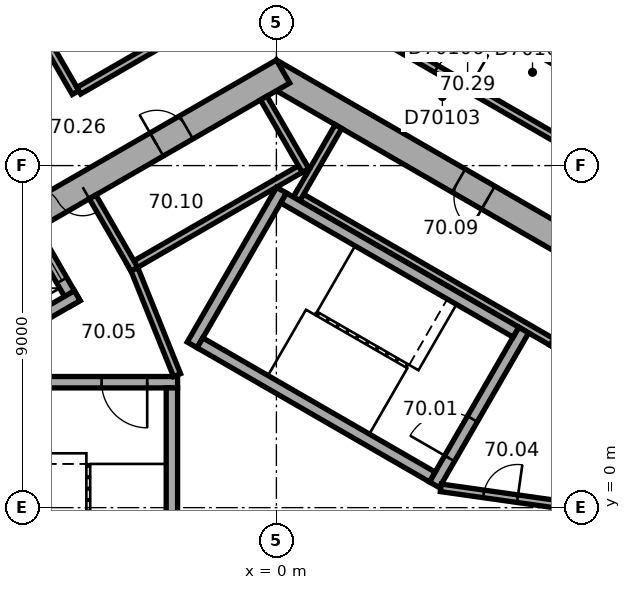
"""IFC4 building model, lengths in metres.
Left out: names, types, materials, properties, quantities, classifications, styles, units other than length and angle.
Written with IfcOpenShell. Run it as: python <this file> out.ifc"""

import sys

from ifc_helpers import new_model, si_unit, direction, frame, frame_2d, origin, place, context, subcontext, project, spatial, rectangle, extrude, element, fill, save


model = new_model("IFC4")
c1 = context("Model", 3, precision=1e-05, world=origin(), true_north=direction((0.0, 1.0)))
c2 = subcontext(c1, "Body", "Model", "MODEL_VIEW")
j1 = project(units=[si_unit("LENGTHUNIT", "METRE"), si_unit("PLANEANGLEUNIT", "RADIAN")], contexts=[c1])
p1 = place(None, origin())
s1 = spatial("IfcSite", under=j1, at=p1, CompositionType="ELEMENT")
p2 = place(p1, origin())
s2 = spatial("IfcBuilding", under=s1, at=p2, CompositionType="ELEMENT")
p3 = place(p2, frame((0.0, 0.0, 285.7)))
s3 = spatial("IfcBuildingStorey", under=s2, at=p3, CompositionType="ELEMENT", Elevation=285.7)
p4 = place(p3, frame((10.025, 5.586, 0.0), z_axis=(0.0, 0.0, 1.0), x_axis=(-0.866026453023, 0.499998182661, 0.0)))
e1 = element("IfcWall", 1, at=p4, inside=s3, PredefinedType="SHEAR", context=c2, shape_type="SweptSolid", body=[
    extrude(rectangle(XDim=11.778, YDim=0.7, at=frame_2d((5.889, 0.0))), origin(), (0.0, 0.0, 1.0), 3.7),
])
p5 = place(p4, frame((5.139, 0.0, 0.0)))
e2 = element("IfcOpeningElement", 2, at=p5, cuts=e1, PredefinedType="OPENING", context=c2, shape_type="SweptSolid", body=[
    extrude(rectangle(XDim=0.9, YDim=2.1, at=frame_2d((0.45, 1.05))), frame((0.0, 0.36, 0.0), z_axis=(0.0, -1.0, 0.0), x_axis=(1.0, 0.0, 0.0)), (0.0, 0.0, 1.0), 0.72),
])
p6 = place(p3, frame((0.175, 11.475, 0.0), z_axis=(0.0, 0.0, 1.0), x_axis=(-0.866026453023, -0.499998182661, 0.0)))
e3 = element("IfcWall", 3, at=p6, inside=s3, PredefinedType="SHEAR", context=c2, shape_type="SweptSolid", body=[
    extrude(rectangle(XDim=11.778, YDim=0.7, at=frame_2d((5.889, 0.0))), origin(), (0.0, 0.0, 1.0), 3.7),
])
p7 = place(p6, frame((6.089, 0.0, 0.0)))
e4 = element("IfcOpeningElement", 4, at=p7, cuts=e3, PredefinedType="OPENING", context=c2, shape_type="SweptSolid", body=[
    extrude(rectangle(XDim=1.5, YDim=2.1, at=frame_2d((0.75, 1.05))), frame((0.0, 0.36, 0.0), z_axis=(0.0, -1.0, 0.0), x_axis=(1.0, 0.0, 0.0)), (0.0, 0.0, 1.0), 0.72),
])
p8 = place(p6, frame((2.939, 0.0, 0.0)))
e5 = element("IfcOpeningElement", 5, at=p8, cuts=e3, PredefinedType="OPENING", context=c2, shape_type="SweptSolid", body=[
    extrude(rectangle(XDim=0.9, YDim=2.1, at=frame_2d((0.45, 1.05))), frame((0.0, 0.36, 0.0), z_axis=(0.0, -1.0, 0.0), x_axis=(1.0, 0.0, 0.0)), (0.0, 0.0, 1.0), 0.72),
])
p9 = place(p3, frame((-2.624, 20.713, 0.0), z_axis=(0.0, 0.0, 1.0), x_axis=(-0.866026460444, -0.499998169808, 0.0)))
e6 = element("IfcWall", 6, at=p9, inside=s3, PredefinedType="STANDARD", context=c2, shape_type="SweptSolid", body=[
    extrude(rectangle(XDim=17.731, YDim=0.2, at=frame_2d((8.866, 0.0))), origin(), (0.0, 0.0, 1.0), 3.7),
])
p10 = place(p9, frame((1.203, 0.0, 0.9)))
e7 = element("IfcOpeningElement", 7, at=p10, cuts=e6, PredefinedType="OPENING", context=c2, shape_type="SweptSolid", body=[
    extrude(rectangle(XDim=2.0, YDim=2.0, at=frame_2d((1.0, 1.0))), frame((0.0, 0.11, 0.0), z_axis=(0.0, -1.0, 0.0), x_axis=(1.0, 0.0, 0.0)), (0.0, 0.0, 1.0), 0.22),
])
p11 = place(p9, frame((4.535, 0.0, 0.9)))
e8 = element("IfcOpeningElement", 8, at=p11, cuts=e6, PredefinedType="OPENING", context=c2, shape_type="SweptSolid", body=[
    extrude(rectangle(XDim=2.0, YDim=2.0, at=frame_2d((1.0, 1.0))), frame((0.0, 0.11, 0.0), z_axis=(0.0, -1.0, 0.0), x_axis=(1.0, 0.0, 0.0)), (0.0, 0.0, 1.0), 0.22),
])
p12 = place(p9, frame((7.867, 0.0, 0.9)))
e9 = element("IfcOpeningElement", 9, at=p12, cuts=e6, PredefinedType="OPENING", context=c2, shape_type="SweptSolid", body=[
    extrude(rectangle(XDim=2.0, YDim=2.0, at=frame_2d((1.0, 1.0))), frame((0.0, 0.11, 0.0), z_axis=(0.0, -1.0, 0.0), x_axis=(1.0, 0.0, 0.0)), (0.0, 0.0, 1.0), 0.22),
])
p13 = place(p9, frame((11.198, 0.0, 0.9)))
e10 = element("IfcOpeningElement", 10, at=p13, cuts=e6, PredefinedType="OPENING", context=c2, shape_type="SweptSolid", body=[
    extrude(rectangle(XDim=2.0, YDim=2.0, at=frame_2d((1.0, 1.0))), frame((0.0, 0.11, 0.0), z_axis=(0.0, -1.0, 0.0), x_axis=(1.0, 0.0, 0.0)), (0.0, 0.0, 1.0), 0.22),
])
p14 = place(p9, frame((14.53, 0.0, 0.9)))
e11 = element("IfcOpeningElement", 11, at=p14, cuts=e6, PredefinedType="OPENING", context=c2, shape_type="SweptSolid", body=[
    extrude(rectangle(XDim=2.0, YDim=2.0, at=frame_2d((1.0, 1.0))), frame((0.0, 0.11, 0.0), z_axis=(0.0, -1.0, 0.0), x_axis=(1.0, 0.0, 0.0)), (0.0, 0.0, 1.0), 0.22),
])
p15 = place(p3, frame((7.424, 4.259, 0.0), z_axis=(0.0, 0.0, 1.0), x_axis=(-0.866026010844, 0.49999894854, 0.0)))
e12 = element("IfcWall", 12, at=p15, inside=s3, PredefinedType="PARTITIONING", context=c2, shape_type="SweptSolid", body=[
    extrude(rectangle(XDim=8.0, YDim=0.2, at=frame_2d((4.0, 0.0))), origin(), (0.0, 0.0, 1.0), 3.42),
])
for number, where, z_axis, x_axis in (
    (13, (7.287, 4.222, 0.0), (0.0, 0.0, 1.0), (0.5, 0.866, 0.0)),
    (14, (0.532, 8.122, 0.0), (0.0, 0.0, 1.0), (0.5, 0.866, 0.0)),
):
    element("IfcWall", number, at=place(p3, frame(where, z_axis=z_axis, x_axis=x_axis)), inside=s3, PredefinedType="PARTITIONING", context=c2, shape_type="SweptSolid", body=[
        extrude(rectangle(XDim=2.2, YDim=0.2, at=frame_2d((1.1, 0.0))), origin(), (0.0, 0.0, 1.0), 3.42),
    ])
p16 = place(p3, frame((0.803, 9.009, 0.0), z_axis=(0.0, 0.0, 1.0), x_axis=(-0.866028230842, -0.499995103361, 0.0)))
e15 = element("IfcWall", 15, at=p16, inside=s3, PredefinedType="PARTITIONING", context=c2, shape_type="SweptSolid", body=[
    extrude(rectangle(XDim=5.4, YDim=0.2, at=frame_2d((2.7, 0.0))), origin(), (0.0, 0.0, 1.0), 3.42),
])
p17 = place(p3, frame((0.767, 8.872, 0.0), z_axis=(0.0, 0.0, 1.0), x_axis=(-0.499994660107, 0.866028486751, 0.0)))
e16 = element("IfcWall", 16, at=p17, inside=s3, PredefinedType="PARTITIONING", context=c2, shape_type="SweptSolid", body=[
    extrude(rectangle(XDim=2.2, YDim=0.2, at=frame_2d((1.1, 0.0))), origin(), (0.0, 0.0, 1.0), 3.42),
])
p18 = place(p3, frame((-3.737, 6.272, 0.0), z_axis=(0.0, 0.0, 1.0), x_axis=(-0.50002983664, 0.866008176907, 0.0)))
e17 = element("IfcWall", 17, at=p18, inside=s3, PredefinedType="PARTITIONING", context=c2, shape_type="SweptSolid", body=[
    extrude(rectangle(XDim=2.2, YDim=0.2, at=frame_2d((1.1, 0.0))), origin(), (0.0, 0.0, 1.0), 3.42),
])
p19 = place(p3, frame((4.158, 0.602, 0.0), z_axis=(0.0, 0.0, 1.0), x_axis=(0.499977259774, 0.866038532462, 0.0)))
e18 = element("IfcWall", 18, at=p19, inside=s3, PredefinedType="SHEAR", context=c2, shape_type="SweptSolid", body=[
    extrude(rectangle(XDim=4.7, YDim=0.3, at=frame_2d((2.35, 0.0))), origin(), (0.0, 0.0, 1.0), 3.42),
])
p20 = place(p19, frame((0.8, 0.0, 0.0)))
e19 = element("IfcOpeningElement", 19, at=p20, cuts=e18, PredefinedType="OPENING", context=c2, shape_type="SweptSolid", body=[
    extrude(rectangle(XDim=1.2, YDim=2.1, at=frame_2d((0.6, 1.05))), frame((0.0, 0.16, 0.0), z_axis=(0.0, -1.0, 0.0), x_axis=(1.0, 0.0, 0.0)), (0.0, 0.0, 1.0), 0.32),
])
p21 = place(p3, frame((-2.216, 4.282, 0.0), z_axis=(0.0, 0.0, 1.0), x_axis=(0.499977259774, 0.866038532462, 0.0)))
e20 = element("IfcWall", 20, at=p21, inside=s3, PredefinedType="SHEAR", context=c2, shape_type="SweptSolid", body=[
    extrude(rectangle(XDim=4.7, YDim=0.3, at=frame_2d((2.35, 0.0))), origin(), (0.0, 0.0, 1.0), 3.42),
])
for number, where, z_axis, x_axis in (
    (21, (4.103, 0.807, 0.0), (0.0, 0.0, 1.0), (-0.866, 0.5, 0.0)),
    (22, (6.303, 4.617, 0.0), (0.0, 0.0, 1.0), (-0.866, 0.5, 0.0)),
):
    element("IfcWall", number, at=place(p3, frame(where, z_axis=z_axis, x_axis=x_axis)), inside=s3, PredefinedType="SHEAR", context=c2, shape_type="SweptSolid", body=[
        extrude(rectangle(XDim=7.06, YDim=0.3, at=frame_2d((3.53, 0.0))), origin(), (0.0, 0.0, 1.0), 3.42),
    ])
p22 = place(p3, frame((-2.6, 3.3, 0.0), z_axis=(0.0, 0.0, 1.0), x_axis=(-1.0, 0.0, 0.0)))
e23 = element("IfcWall", 23, at=p22, inside=s3, PredefinedType="SHEAR", context=c2, shape_type="SweptSolid", body=[
    extrude(rectangle(XDim=4.7, YDim=0.3, at=frame_2d((2.35, 0.0))), origin(), (0.0, 0.0, 1.0), 3.42),
])
p23 = place(p22, frame((0.8, 0.0, 0.0)))
e24 = element("IfcOpeningElement", 24, at=p23, cuts=e23, PredefinedType="OPENING", context=c2, shape_type="SweptSolid", body=[
    extrude(rectangle(XDim=1.2, YDim=2.1, at=frame_2d((0.6, 1.05))), frame((0.0, 0.16, 0.0), z_axis=(0.0, -1.0, 0.0), x_axis=(1.0, 0.0, 0.0)), (0.0, 0.0, 1.0), 0.32),
])
p24 = place(p3, frame((-2.75, 3.15, 0.0), z_axis=(0.0, 0.0, 1.0), x_axis=(0.0, -1.0, 0.0)))
e25 = element("IfcWall", 25, at=p24, inside=s3, PredefinedType="SHEAR", context=c2, shape_type="SweptSolid", body=[
    extrude(rectangle(XDim=7.06, YDim=0.3, at=frame_2d((3.53, 0.0))), origin(), (0.0, 0.0, 1.0), 3.42),
])
p25 = place(p3, frame((4.327, 0.521, 0.0), z_axis=(0.0, 0.0, 1.0), x_axis=(0.990124376366, -0.14019172346, 0.0)))
e26 = element("IfcWall", 26, at=p25, inside=s3, PredefinedType="PARTITIONING", context=c2, shape_type="SweptSolid", body=[
    extrude(rectangle(XDim=3.002, YDim=0.2, at=frame_2d((1.501, 0.0))), origin(), (0.0, 0.0, 1.0), 3.42),
])
p26 = place(p25, frame((1.138, 0.0, 0.0)))
e27 = element("IfcOpeningElement", 27, at=p26, cuts=e26, PredefinedType="OPENING", context=c2, shape_type="SweptSolid", body=[
    extrude(rectangle(XDim=0.9, YDim=2.1, at=frame_2d((0.45, 1.05))), frame((0.0, 0.11, 0.0), z_axis=(0.0, -1.0, 0.0), x_axis=(1.0, 0.0, 0.0)), (0.0, 0.0, 1.0), 0.22),
])
p27 = place(p3, frame((-5.295, 5.372, 0.0), z_axis=(0.0, 0.0, 1.0), x_axis=(-0.500077893725, 0.86598042715, 0.0)))
e28 = element("IfcWall", 28, at=p27, inside=s3, PredefinedType="SHEAR", context=c2, shape_type="SweptSolid", body=[
    extrude(rectangle(XDim=2.2, YDim=0.3, at=frame_2d((1.1, 0.0))), origin(), (0.0, 0.0, 1.0), 3.42),
])
p28 = place(p27, frame((0.7, 0.0, 0.0)))
e29 = element("IfcOpeningElement", 29, at=p28, cuts=e28, PredefinedType="OPENING", context=c2, shape_type="SweptSolid", body=[
    extrude(rectangle(XDim=1.1, YDim=2.1, at=frame_2d((0.55, 1.05))), frame((0.0, 0.16, 0.0), z_axis=(0.0, -1.0, 0.0), x_axis=(1.0, 0.0, 0.0)), (0.0, 0.0, 1.0), 0.32),
])
p29 = place(p3, frame((-5.24, 5.577, 0.0), z_axis=(0.0, 0.0, 1.0), x_axis=(-0.866014461049, -0.500018952895, 0.0)))
e30 = element("IfcWall", 30, at=p29, inside=s3, PredefinedType="SHEAR", context=c2, shape_type="SweptSolid", body=[
    extrude(rectangle(XDim=3.35, YDim=0.3, at=frame_2d((1.675, 0.0))), origin(), (0.0, 0.0, 1.0), 3.42),
])
p30 = place(p3, frame((-2.615, 3.487, 0.0), z_axis=(0.0, 0.0, 1.0), x_axis=(-0.373576831041, 0.92759924068, 0.0)))
e31 = element("IfcWall", 31, at=p30, inside=s3, PredefinedType="PARTITIONING", context=c2, shape_type="SweptSolid", body=[
    extrude(rectangle(XDim=3.002, YDim=0.2, at=frame_2d((1.501, 0.0))), origin(), (0.0, 0.0, 1.0), 3.42),
])
p31 = place(p3, frame((-8.46, 16.42, 0.0), z_axis=(0.0, 0.0, 1.0), x_axis=(0.500005339912, -0.866022320763, 0.0)))
e32 = element("IfcWall", 32, at=p31, inside=s3, PredefinedType="PARTITIONING", context=c2, shape_type="SweptSolid", body=[
    extrude(rectangle(XDim=6.35, YDim=0.2, at=frame_2d((3.175, 0.0))), origin(), (0.0, 0.0, 1.0), 2.87),
])
p32 = place(p31, frame((2.675, 0.0, 0.0)))
e33 = element("IfcOpeningElement", 33, at=p32, cuts=e32, PredefinedType="OPENING", context=c2, shape_type="SweptSolid", body=[
    extrude(rectangle(XDim=1.0, YDim=2.1, at=frame_2d((0.5, 1.05))), frame((0.0, 0.11, 0.0), z_axis=(0.0, -1.0, 0.0), x_axis=(1.0, 0.0, 0.0)), (0.0, 0.0, 1.0), 0.22),
])
p33 = place(p3, frame((-0.95, 13.423, 0.0), z_axis=(0.0, 0.0, 1.0), x_axis=(-0.86603557629, -0.499982380289, 0.0)))
e34 = element("IfcWall", 34, at=p33, inside=s3, PredefinedType="PARTITIONING", context=c2, shape_type="SweptSolid", body=[
    extrude(rectangle(XDim=4.906, YDim=0.2, at=frame_2d((2.453, 0.0))), origin(), (0.0, 0.0, 1.0), 3.42),
])
p34 = place(p3, frame((8.207, 11.197, 0.0), z_axis=(0.0, 0.0, 1.0), x_axis=(-0.866030514021, 0.499991148707, 0.0)))
e35 = element("IfcWall", 35, at=p34, inside=s3, PredefinedType="PARTITIONING", context=c2, shape_type="SweptSolid", body=[
    extrude(rectangle(XDim=6.476, YDim=0.12, at=frame_2d((3.238, 0.0))), origin(), (0.0, 0.0, 1.0), 3.42),
])
p35 = place(p34, frame((5.011, 0.0, 0.0)))
e36 = element("IfcOpeningElement", 36, at=p35, cuts=e35, PredefinedType="OPENING", context=c2, shape_type="SweptSolid", body=[
    extrude(rectangle(XDim=1.0, YDim=2.1, at=frame_2d((0.5, 1.05))), frame((0.0, 0.07, 0.0), z_axis=(0.0, -1.0, 0.0), x_axis=(1.0, 0.0, 0.0)), (0.0, 0.0, 1.0), 0.14),
])
p36 = place(p34, frame((0.95, 0.0, 0.0)))
e37 = element("IfcOpeningElement", 37, at=p36, cuts=e35, PredefinedType="OPENING", context=c2, shape_type="SweptSolid", body=[
    extrude(rectangle(XDim=0.9, YDim=2.1, at=frame_2d((0.45, 1.05))), frame((0.0, 0.07, 0.0), z_axis=(0.0, -1.0, 0.0), x_axis=(1.0, 0.0, 0.0)), (0.0, 0.0, 1.0), 0.14),
])
p37 = place(p34, frame((3.223, 0.0, 0.0)))
e38 = element("IfcOpeningElement", 38, at=p37, cuts=e35, PredefinedType="OPENING", context=c2, shape_type="SweptSolid", body=[
    extrude(rectangle(XDim=0.9, YDim=2.1, at=frame_2d((0.45, 1.05))), frame((0.0, 0.07, 0.0), z_axis=(0.0, -1.0, 0.0), x_axis=(1.0, 0.0, 0.0)), (0.0, 0.0, 1.0), 0.14),
])
p38 = place(p3, frame((10.934, 7.659, 0.0), z_axis=(0.0, 0.0, 1.0), x_axis=(-0.866030932647, 0.499990423607, 0.0)))
e39 = element("IfcWall", 39, at=p38, inside=s3, PredefinedType="PARTITIONING", context=c2, shape_type="SweptSolid", body=[
    extrude(rectangle(XDim=11.488, YDim=0.2, at=frame_2d((5.744, 0.0))), origin(), (0.0, 0.0, 1.0), 3.42),
])
p39 = place(p38, frame((6.764, 0.0, 0.0)))
e40 = element("IfcOpeningElement", 40, at=p39, cuts=e39, PredefinedType="OPENING", context=c2, shape_type="SweptSolid", body=[
    extrude(rectangle(XDim=1.0, YDim=2.1, at=frame_2d((0.5, 1.05))), frame((0.0, 0.11, 0.0), z_axis=(0.0, -1.0, 0.0), x_axis=(1.0, 0.0, 0.0)), (0.0, 0.0, 1.0), 0.22),
])
p40 = place(p7, origin())
e41 = element("IfcDoor", 41, at=p40, inside=s3, OperationType="DOUBLE_DOOR_SINGLE_SWING", PredefinedType="DOOR", context=c2, shape_type="SweptSolid", body=[
    extrude(rectangle(XDim=1.5, YDim=2.1, at=frame_2d((0.75, 1.05))), frame((0.0, 0.025, 0.0), z_axis=(0.0, -1.0, 0.0), x_axis=(1.0, 0.0, 0.0)), (0.0, 0.0, 1.0), 0.05),
])
fill(e4, e41)
p41 = place(p20, origin())
e42 = element("IfcDoor", 42, at=p41, inside=s3, OperationType="SINGLE_SWING_RIGHT", PredefinedType="DOOR", context=c2, shape_type="SweptSolid", body=[
    extrude(rectangle(XDim=1.2, YDim=2.1, at=frame_2d((0.6, 1.05))), frame((0.0, 0.025, 0.0), z_axis=(0.0, -1.0, 0.0), x_axis=(1.0, 0.0, 0.0)), (0.0, 0.0, 1.0), 0.05),
])
fill(e19, e42)
p42 = place(p23, origin())
e43 = element("IfcDoor", 43, at=p42, inside=s3, OperationType="SINGLE_SWING_RIGHT", PredefinedType="DOOR", context=c2, shape_type="SweptSolid", body=[
    extrude(rectangle(XDim=1.2, YDim=2.1, at=frame_2d((0.6, 1.05))), frame((0.0, 0.025, 0.0), z_axis=(0.0, -1.0, 0.0), x_axis=(1.0, 0.0, 0.0)), (0.0, 0.0, 1.0), 0.05),
])
fill(e24, e43)
p43 = place(p26, origin())
e44 = element("IfcDoor", 44, at=p43, inside=s3, OperationType="SINGLE_SWING_LEFT", PredefinedType="DOOR", context=c2, shape_type="SweptSolid", body=[
    extrude(rectangle(XDim=0.9, YDim=2.1, at=frame_2d((0.45, 1.05))), frame((0.0, 0.025, 0.0), z_axis=(0.0, -1.0, 0.0), x_axis=(1.0, 0.0, 0.0)), (0.0, 0.0, 1.0), 0.05),
])
fill(e27, e44)
p44 = place(p5, origin())
e45 = element("IfcDoor", 45, at=p44, inside=s3, OperationType="SINGLE_SWING_LEFT", PredefinedType="DOOR", context=c2, shape_type="SweptSolid", body=[
    extrude(rectangle(XDim=0.9, YDim=2.1, at=frame_2d((0.45, 1.05))), frame((0.0, 0.025, 0.0), z_axis=(0.0, -1.0, 0.0), x_axis=(1.0, 0.0, 0.0)), (0.0, 0.0, 1.0), 0.05),
])
fill(e2, e45)
p45 = place(p8, origin())
e46 = element("IfcDoor", 46, at=p45, inside=s3, OperationType="SINGLE_SWING_LEFT", PredefinedType="DOOR", context=c2, shape_type="SweptSolid", body=[
    extrude(rectangle(XDim=0.9, YDim=2.1, at=frame_2d((0.45, 1.05))), frame((0.0, 0.025, 0.0), z_axis=(0.0, -1.0, 0.0), x_axis=(1.0, 0.0, 0.0)), (0.0, 0.0, 1.0), 0.05),
])
fill(e5, e46)
p46 = place(p28, origin())
e47 = element("IfcDoor", 47, at=p46, inside=s3, OperationType="DOUBLE_DOOR_SLIDING", PredefinedType="DOOR", context=c2, shape_type="SweptSolid", body=[
    extrude(rectangle(XDim=1.1, YDim=2.1, at=frame_2d((0.55, 1.05))), frame((0.0, 0.025, 0.0), z_axis=(0.0, -1.0, 0.0), x_axis=(1.0, 0.0, 0.0)), (0.0, 0.0, 1.0), 0.05),
])
fill(e29, e47)
p47 = place(p39, origin())
e48 = element("IfcDoor", 48, at=p47, inside=s3, OperationType="SINGLE_SWING_LEFT", PredefinedType="DOOR", context=c2, shape_type="SweptSolid", body=[
    extrude(rectangle(XDim=1.0, YDim=2.1, at=frame_2d((0.5, 1.05))), frame((0.0, 0.025, 0.0), z_axis=(0.0, -1.0, 0.0), x_axis=(1.0, 0.0, 0.0)), (0.0, 0.0, 1.0), 0.05),
])
fill(e40, e48)
p48 = place(p36, origin())
e49 = element("IfcDoor", 49, at=p48, inside=s3, OperationType="SINGLE_SWING_LEFT", PredefinedType="DOOR", context=c2, shape_type="SweptSolid", body=[
    extrude(rectangle(XDim=0.9, YDim=2.1, at=frame_2d((0.45, 1.05))), frame((0.0, 0.025, 0.0), z_axis=(0.0, -1.0, 0.0), x_axis=(1.0, 0.0, 0.0)), (0.0, 0.0, 1.0), 0.05),
])
fill(e37, e49)
save(model, sys.argv[1])
